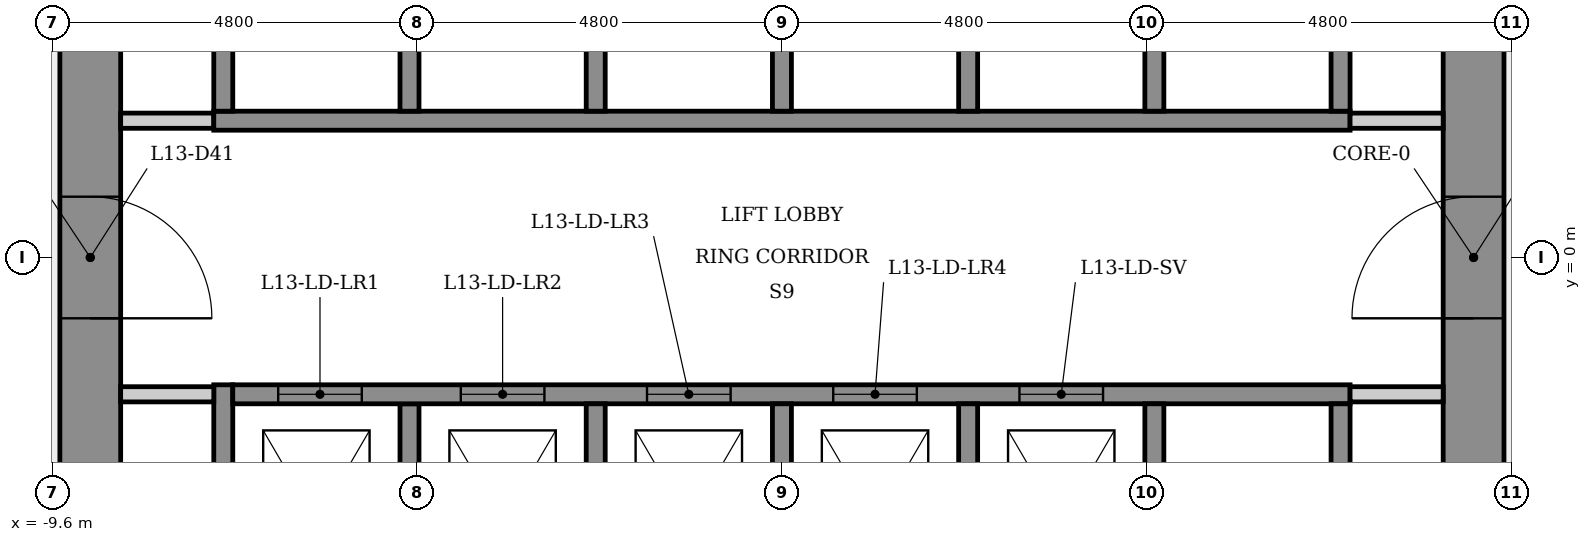
"""IFC4 building model, lengths in metres.
Left out: names, types, materials, properties, quantities, classifications, styles, units other than length and angle.
Written with IfcOpenShell. Run it as: python <this file> out.ifc"""

import sys

from ifc_helpers import new_model, si_unit, direction, frame, frame_2d, origin, place, context, subcontext, project, spatial, rectangle, extrude, element, fill, save


model = new_model("IFC4")
c1 = context("Model", 3, precision=1e-05, world=origin(), true_north=direction((0.0, 1.0)))
c2 = subcontext(c1, "Body", "Model", "MODEL_VIEW")
j1 = project(units=[si_unit("LENGTHUNIT", "METRE"), si_unit("PLANEANGLEUNIT", "RADIAN")], contexts=[c1])
p1 = place(None, origin())
s1 = spatial("IfcSite", under=j1, at=p1, CompositionType="ELEMENT")
p2 = place(p1, origin())
s2 = spatial("IfcBuilding", under=s1, at=p2, CompositionType="ELEMENT")
p3 = place(p2, frame((0.0, 0.0, 52.7)))
s3 = spatial("IfcBuildingStorey", under=s2, at=p3, CompositionType="ELEMENT", Elevation=52.7)
p4 = place(p3, frame((9.1, -5.485, 0.0), z_axis=(0.0, 0.0, 1.0), x_axis=(0.0, 1.0, 0.0)))
e1 = element("IfcWall", 1, at=p4, inside=s3, PredefinedType="SHEAR", context=c2, shape_type="SweptSolid", body=[
    extrude(rectangle(XDim=10.97, YDim=0.8, at=frame_2d((5.485, 0.0))), origin(), (0.0, 0.0, 1.0), 3.4),
])
p5 = place(p4, frame((4.685, 0.0, 0.0)))
e2 = element("IfcOpeningElement", 2, at=p5, cuts=e1, PredefinedType="OPENING", context=c2, shape_type="SweptSolid", body=[
    extrude(rectangle(XDim=1.6, YDim=2.1, at=frame_2d((0.8, 1.05))), frame((0.0, 0.41, 0.0), z_axis=(0.0, -1.0, 0.0), x_axis=(1.0, 0.0, 0.0)), (0.0, 0.0, 1.0), 0.82),
])
p6 = place(p3, frame((-9.1, 5.485, 0.0), z_axis=(0.0, 0.0, 1.0), x_axis=(0.0, -1.0, 0.0)))
e3 = element("IfcWall", 3, at=p6, inside=s3, PredefinedType="SHEAR", context=c2, shape_type="SweptSolid", body=[
    extrude(rectangle(XDim=10.97, YDim=0.8, at=frame_2d((5.485, 0.0))), origin(), (0.0, 0.0, 1.0), 3.4),
])
p7 = place(p6, frame((4.685, 0.0, 0.0)))
e4 = element("IfcOpeningElement", 4, at=p7, cuts=e3, PredefinedType="OPENING", context=c2, shape_type="SweptSolid", body=[
    extrude(rectangle(XDim=1.6, YDim=2.1, at=frame_2d((0.8, 1.05))), frame((0.0, 0.41, 0.0), z_axis=(0.0, -1.0, 0.0), x_axis=(1.0, 0.0, 0.0)), (0.0, 0.0, 1.0), 0.82),
])
p8 = place(p3, frame((-8.7, 1.8, 0.0), z_axis=(0.0, 0.0, 1.0), x_axis=(1.0, 0.0, 0.0)))
e5 = element("IfcWall", 5, at=p8, inside=s3, PredefinedType="PARTITIONING", context=c2, shape_type="SweptSolid", body=[
    extrude(rectangle(XDim=1.225, YDim=0.2, at=frame_2d((0.613, 0.0))), origin(), (0.0, 0.0, 1.0), 3.05),
])
p9 = place(p3, frame((-7.475, 1.8, 0.0), z_axis=(0.0, 0.0, 1.0), x_axis=(1.0, 0.0, 0.0)))
e6 = element("IfcWall", 6, at=p9, inside=s3, PredefinedType="SHEAR", context=c2, shape_type="SweptSolid", body=[
    extrude(rectangle(XDim=14.95, YDim=0.25, at=frame_2d((7.475, 0.0))), origin(), (0.0, 0.0, 1.0), 3.05),
])
p10 = place(p3, frame((-7.35, -5.73, 0.0), z_axis=(0.0, 0.0, 1.0), x_axis=(0.0, 1.0, 0.0)))
e7 = element("IfcWall", 7, at=p10, inside=s3, PredefinedType="SHEAR", context=c2, shape_type="SweptSolid", body=[
    extrude(rectangle(XDim=4.055, YDim=0.25, at=frame_2d((2.028, 0.0))), origin(), (0.0, 0.0, 1.0), 3.05),
])
p11 = place(p3, frame((-7.35, 1.925, 0.0), z_axis=(0.0, 0.0, 1.0), x_axis=(0.0, 1.0, 0.0)))
e8 = element("IfcWall", 8, at=p11, inside=s3, PredefinedType="SHEAR", context=c2, shape_type="SweptSolid", body=[
    extrude(rectangle(XDim=3.805, YDim=0.25, at=frame_2d((1.903, 0.0))), origin(), (0.0, 0.0, 1.0), 3.05),
])
p12 = place(p3, frame((-7.475, -1.8, 0.0), z_axis=(0.0, 0.0, 1.0), x_axis=(-1.0, 0.0, 0.0)))
e9 = element("IfcWall", 9, at=p12, inside=s3, PredefinedType="PARTITIONING", context=c2, shape_type="SweptSolid", body=[
    extrude(rectangle(XDim=1.225, YDim=0.2, at=frame_2d((0.613, 0.0))), origin(), (0.0, 0.0, 1.0), 3.05),
])
for number, where, z_axis, x_axis in (
    (10, (-4.9, -1.925, 0.0), (0.0, 0.0, 1.0), (0.0, -1.0, 0.0)),
    (11, (-4.9, 5.025, 0.0), (0.0, 0.0, 1.0), (0.0, -1.0, 0.0)),
):
    element("IfcWall", number, at=place(p3, frame(where, z_axis=z_axis, x_axis=x_axis)), inside=s3, PredefinedType="SHEAR", context=c2, shape_type="SweptSolid", body=[
        extrude(rectangle(XDim=3.1, YDim=0.25, at=frame_2d((1.55, 0.0))), origin(), (0.0, 0.0, 1.0), 3.4),
    ])
p13 = place(p3, frame((-7.225, -1.8, 0.0), z_axis=(0.0, 0.0, 1.0), x_axis=(1.0, 0.0, 0.0)))
e12 = element("IfcWall", 12, at=p13, inside=s3, PredefinedType="SHEAR", context=c2, shape_type="SweptSolid", body=[
    extrude(rectangle(XDim=14.7, YDim=0.25, at=frame_2d((7.35, 0.0))), origin(), (0.0, 0.0, 1.0), 3.05),
])
p14 = place(p13, frame((0.597, 0.0, 0.0)))
e13 = element("IfcOpeningElement", 13, at=p14, cuts=e12, PredefinedType="OPENING", context=c2, shape_type="SweptSolid", body=[
    extrude(rectangle(XDim=1.1, YDim=2.1, at=frame_2d((0.55, 1.05))), frame((0.0, 0.135, 0.0), z_axis=(0.0, -1.0, 0.0), x_axis=(1.0, 0.0, 0.0)), (0.0, 0.0, 1.0), 0.27),
])
p15 = place(p13, frame((3.0, 0.0, 0.0)))
e14 = element("IfcOpeningElement", 14, at=p15, cuts=e12, PredefinedType="OPENING", context=c2, shape_type="SweptSolid", body=[
    extrude(rectangle(XDim=1.1, YDim=2.1, at=frame_2d((0.55, 1.05))), frame((0.0, 0.135, 0.0), z_axis=(0.0, -1.0, 0.0), x_axis=(1.0, 0.0, 0.0)), (0.0, 0.0, 1.0), 0.27),
])
p16 = place(p13, frame((5.45, 0.0, 0.0)))
e15 = element("IfcOpeningElement", 15, at=p16, cuts=e12, PredefinedType="OPENING", context=c2, shape_type="SweptSolid", body=[
    extrude(rectangle(XDim=1.1, YDim=2.1, at=frame_2d((0.55, 1.05))), frame((0.0, 0.135, 0.0), z_axis=(0.0, -1.0, 0.0), x_axis=(1.0, 0.0, 0.0)), (0.0, 0.0, 1.0), 0.27),
])
p17 = place(p13, frame((7.9, 0.0, 0.0)))
e16 = element("IfcOpeningElement", 16, at=p17, cuts=e12, PredefinedType="OPENING", context=c2, shape_type="SweptSolid", body=[
    extrude(rectangle(XDim=1.1, YDim=2.1, at=frame_2d((0.55, 1.05))), frame((0.0, 0.135, 0.0), z_axis=(0.0, -1.0, 0.0), x_axis=(1.0, 0.0, 0.0)), (0.0, 0.0, 1.0), 0.27),
])
p18 = place(p13, frame((10.35, 0.0, 0.0)))
e17 = element("IfcOpeningElement", 17, at=p18, cuts=e12, PredefinedType="OPENING", context=c2, shape_type="SweptSolid", body=[
    extrude(rectangle(XDim=1.1, YDim=2.1, at=frame_2d((0.55, 1.05))), frame((0.0, 0.135, 0.0), z_axis=(0.0, -1.0, 0.0), x_axis=(1.0, 0.0, 0.0)), (0.0, 0.0, 1.0), 0.27),
])
for number, where, z_axis, x_axis in (
    (18, (-2.45, -1.925, 0.0), (0.0, 0.0, 1.0), (0.0, -1.0, 0.0)),
    (19, (-2.45, 5.025, 0.0), (0.0, 0.0, 1.0), (0.0, -1.0, 0.0)),
    (20, (0.0, -1.925, 0.0), (0.0, 0.0, 1.0), (0.0, -1.0, 0.0)),
    (21, (0.0, 5.025, 0.0), (0.0, 0.0, 1.0), (0.0, -1.0, 0.0)),
    (22, (2.45, -1.925, 0.0), (0.0, 0.0, 1.0), (0.0, -1.0, 0.0)),
    (23, (2.45, 5.025, 0.0), (0.0, 0.0, 1.0), (0.0, -1.0, 0.0)),
    (24, (4.9, -1.925, 0.0), (0.0, 0.0, 1.0), (0.0, -1.0, 0.0)),
    (25, (4.9, 5.025, 0.0), (0.0, 0.0, 1.0), (0.0, -1.0, 0.0)),
):
    element("IfcWall", number, at=place(p3, frame(where, z_axis=z_axis, x_axis=x_axis)), inside=s3, PredefinedType="SHEAR", context=c2, shape_type="SweptSolid", body=[
        extrude(rectangle(XDim=3.1, YDim=0.25, at=frame_2d((1.55, 0.0))), origin(), (0.0, 0.0, 1.0), 3.4),
    ])
p19 = place(p3, frame((7.475, 1.8, 0.0), z_axis=(0.0, 0.0, 1.0), x_axis=(1.0, 0.0, 0.0)))
e26 = element("IfcWall", 26, at=p19, inside=s3, PredefinedType="PARTITIONING", context=c2, shape_type="SweptSolid", body=[
    extrude(rectangle(XDim=1.225, YDim=0.2, at=frame_2d((0.613, 0.0))), origin(), (0.0, 0.0, 1.0), 3.05),
])
for number, where, z_axis, x_axis in (
    (27, (7.35, -1.925, 0.0), (0.0, 0.0, 1.0), (0.0, -1.0, 0.0)),
    (28, (7.35, 5.73, 0.0), (0.0, 0.0, 1.0), (0.0, -1.0, 0.0)),
):
    element("IfcWall", number, at=place(p3, frame(where, z_axis=z_axis, x_axis=x_axis)), inside=s3, PredefinedType="SHEAR", context=c2, shape_type="SweptSolid", body=[
        extrude(rectangle(XDim=3.805, YDim=0.25, at=frame_2d((1.903, 0.0))), origin(), (0.0, 0.0, 1.0), 3.05),
    ])
p20 = place(p3, frame((8.7, -1.8, 0.0), z_axis=(0.0, 0.0, 1.0), x_axis=(-1.0, 0.0, 0.0)))
e29 = element("IfcWall", 29, at=p20, inside=s3, PredefinedType="PARTITIONING", context=c2, shape_type="SweptSolid", body=[
    extrude(rectangle(XDim=1.225, YDim=0.2, at=frame_2d((0.613, 0.0))), origin(), (0.0, 0.0, 1.0), 3.05),
])
p21 = place(p14, origin())
e30 = element("IfcDoor", 30, at=p21, inside=s3, OperationType="SLIDING_TO_LEFT", PredefinedType="DOOR", context=c2, shape_type="SweptSolid", body=[
    extrude(rectangle(XDim=1.1, YDim=2.1, at=frame_2d((0.55, 1.05))), frame((0.0, 0.025, 0.0), z_axis=(0.0, -1.0, 0.0), x_axis=(1.0, 0.0, 0.0)), (0.0, 0.0, 1.0), 0.05),
])
fill(e13, e30)
p22 = place(p15, origin())
e31 = element("IfcDoor", 31, at=p22, inside=s3, OperationType="SLIDING_TO_LEFT", PredefinedType="DOOR", context=c2, shape_type="SweptSolid", body=[
    extrude(rectangle(XDim=1.1, YDim=2.1, at=frame_2d((0.55, 1.05))), frame((0.0, 0.025, 0.0), z_axis=(0.0, -1.0, 0.0), x_axis=(1.0, 0.0, 0.0)), (0.0, 0.0, 1.0), 0.05),
])
fill(e14, e31)
p23 = place(p16, origin())
e32 = element("IfcDoor", 32, at=p23, inside=s3, OperationType="SLIDING_TO_LEFT", PredefinedType="DOOR", context=c2, shape_type="SweptSolid", body=[
    extrude(rectangle(XDim=1.1, YDim=2.1, at=frame_2d((0.55, 1.05))), frame((0.0, 0.025, 0.0), z_axis=(0.0, -1.0, 0.0), x_axis=(1.0, 0.0, 0.0)), (0.0, 0.0, 1.0), 0.05),
])
fill(e15, e32)
p24 = place(p17, origin())
e33 = element("IfcDoor", 33, at=p24, inside=s3, OperationType="SLIDING_TO_LEFT", PredefinedType="DOOR", context=c2, shape_type="SweptSolid", body=[
    extrude(rectangle(XDim=1.1, YDim=2.1, at=frame_2d((0.55, 1.05))), frame((0.0, 0.025, 0.0), z_axis=(0.0, -1.0, 0.0), x_axis=(1.0, 0.0, 0.0)), (0.0, 0.0, 1.0), 0.05),
])
fill(e16, e33)
p25 = place(p18, origin())
e34 = element("IfcDoor", 34, at=p25, inside=s3, OperationType="SLIDING_TO_LEFT", PredefinedType="DOOR", context=c2, shape_type="SweptSolid", body=[
    extrude(rectangle(XDim=1.1, YDim=2.1, at=frame_2d((0.55, 1.05))), frame((0.0, 0.025, 0.0), z_axis=(0.0, -1.0, 0.0), x_axis=(1.0, 0.0, 0.0)), (0.0, 0.0, 1.0), 0.05),
])
fill(e17, e34)
p26 = place(p5, origin())
e35 = element("IfcDoor", 35, at=p26, inside=s3, OperationType="SINGLE_SWING_LEFT", PredefinedType="DOOR", context=c2, shape_type="SweptSolid", body=[
    extrude(rectangle(XDim=1.6, YDim=2.1, at=frame_2d((0.8, 1.05))), frame((0.0, 0.025, 0.0), z_axis=(0.0, -1.0, 0.0), x_axis=(1.0, 0.0, 0.0)), (0.0, 0.0, 1.0), 0.05),
])
fill(e2, e35)
p27 = place(p7, origin())
e36 = element("IfcDoor", 36, at=p27, inside=s3, OperationType="SINGLE_SWING_RIGHT", PredefinedType="DOOR", context=c2, shape_type="SweptSolid", body=[
    extrude(rectangle(XDim=1.6, YDim=2.1, at=frame_2d((0.8, 1.05))), frame((0.0, 0.025, 0.0), z_axis=(0.0, -1.0, 0.0), x_axis=(1.0, 0.0, 0.0)), (0.0, 0.0, 1.0), 0.05),
])
fill(e4, e36)
save(model, sys.argv[1])
